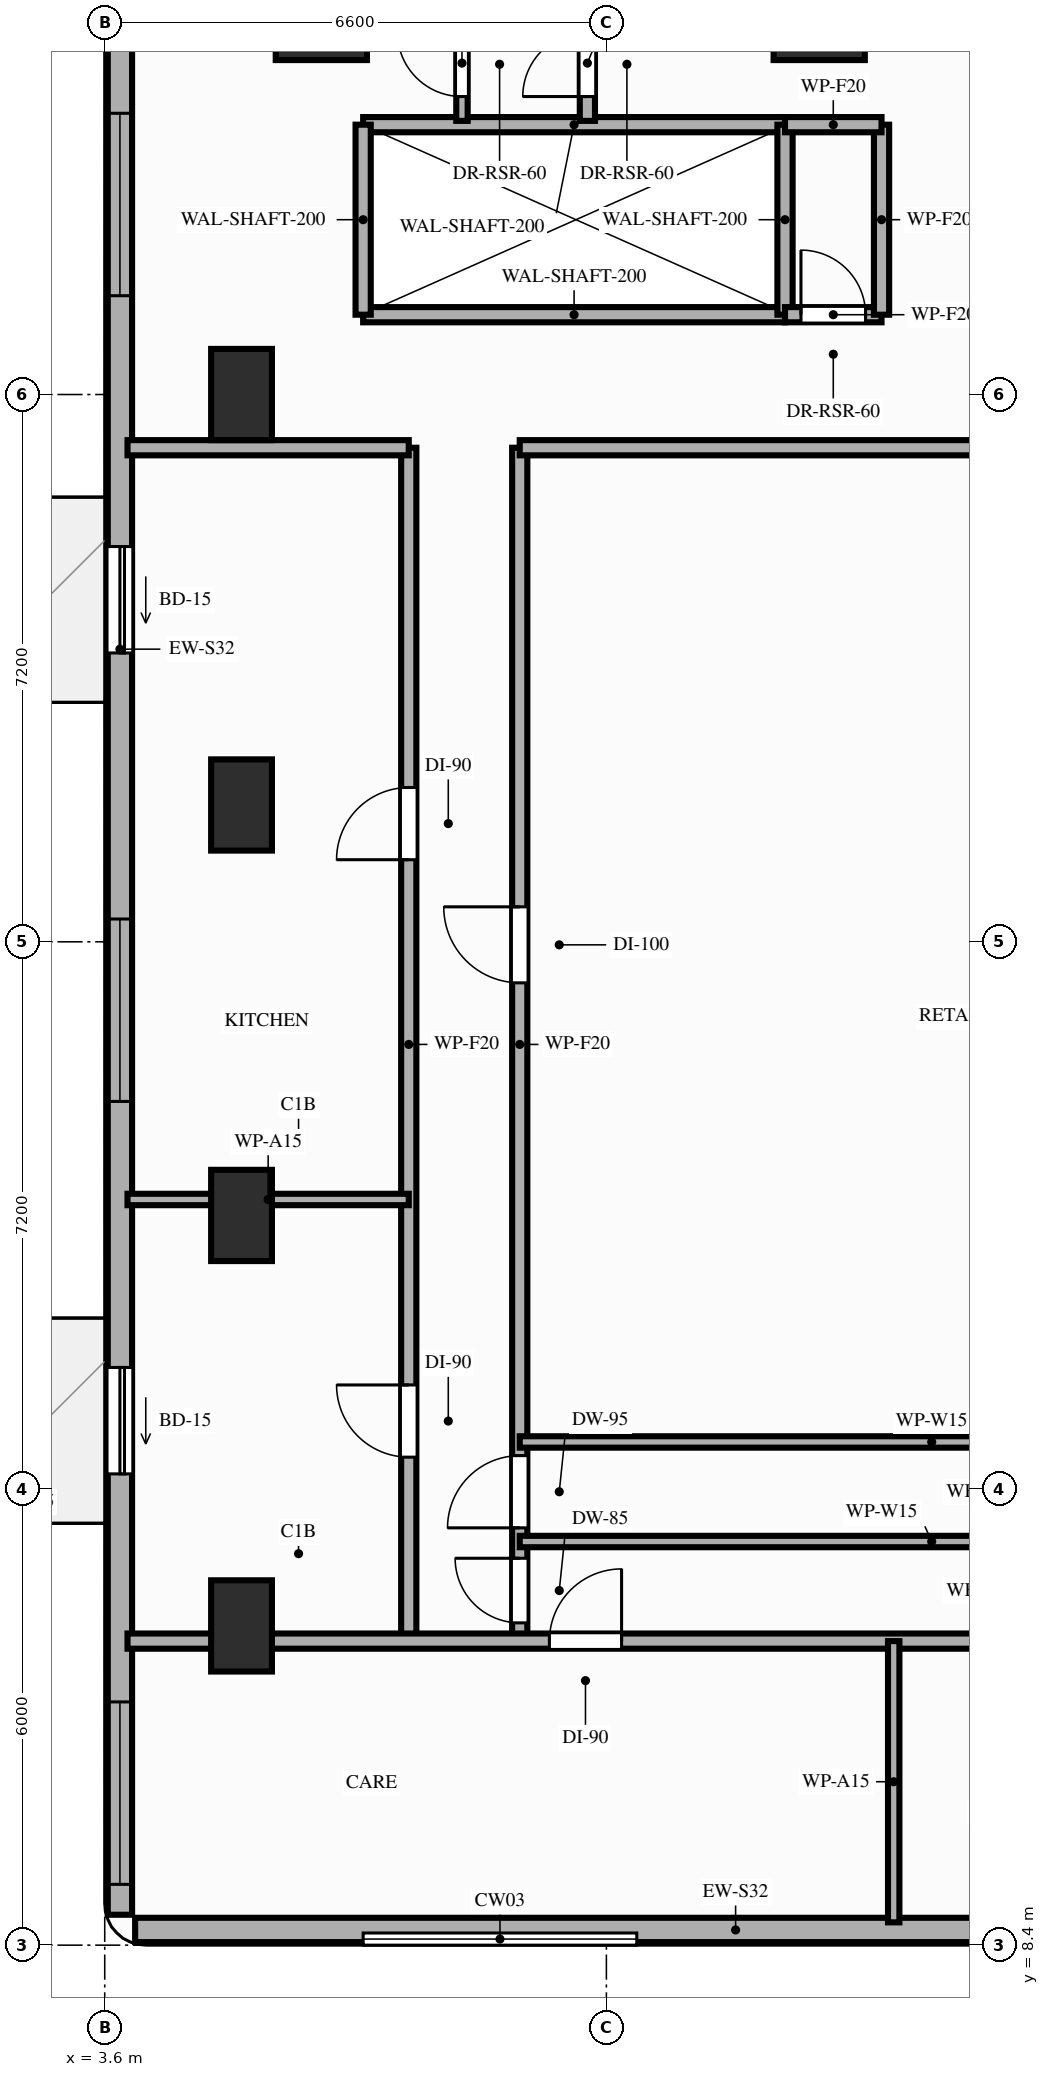
"""IFC4 building model, lengths in metres.
Left out: names, types, materials, properties, quantities, classifications, styles, units other than length and angle.
Written with IfcOpenShell. Run it as: python <this file> out.ifc"""

import sys

from ifc_helpers import new_model, si_unit, direction, frame, frame_2d, origin, origin_2d, place, context, subcontext, project, spatial, rectangle, extrude, element, fill, save


model = new_model("IFC4")
c1 = context("Model", 3, precision=1e-05, world=origin(), true_north=direction((0.0, 1.0)))
c2 = subcontext(c1, "Body", "Model", "MODEL_VIEW")
j1 = project(units=[si_unit("LENGTHUNIT", "METRE"), si_unit("PLANEANGLEUNIT", "RADIAN")], contexts=[c1])
p1 = place(None, origin())
s1 = spatial("IfcSite", under=j1, at=p1, CompositionType="ELEMENT")
p2 = place(p1, origin())
s2 = spatial("IfcBuilding", under=s1, at=p2, CompositionType="ELEMENT")
p3 = place(p2, frame((0.0, 0.0, 72.4)))
s3 = spatial("IfcBuildingStorey", under=s2, at=p3, CompositionType="ELEMENT", Elevation=72.4)
for number, where, z_axis, x_axis in (
    (1, (6.45, 33.8, 0.0), (0.0, 0.0, 1.0), (1.0, 0.0, 0.0)),
    (2, (13.0, 33.8, 0.0), (0.0, 0.0, 1.0), (1.0, 0.0, 0.0)),
):
    element("IfcColumn", number, at=place(p3, frame(where, z_axis=z_axis, x_axis=x_axis)), inside=s3, PredefinedType="COLUMN", context=c2, shape_type="SweptSolid", body=[
        extrude(rectangle(XDim=1.2, YDim=1.2, at=origin_2d()), origin(), (0.0, 0.0, 1.0), 3.2),
    ])
for number, where, z_axis, x_axis in (
    (3, (5.4, 12.6, 0.0), (0.0, 0.0, 1.0), (1.0, 0.0, 0.0)),
    (4, (5.4, 18.0, 0.0), (0.0, 0.0, 1.0), (1.0, 0.0, 0.0)),
    (5, (5.4, 23.4, 0.0), (0.0, 0.0, 1.0), (1.0, 0.0, 0.0)),
    (6, (5.4, 28.8, 0.0), (0.0, 0.0, 1.0), (1.0, 0.0, 0.0)),
):
    element("IfcColumn", number, at=place(p3, frame(where, z_axis=z_axis, x_axis=x_axis)), inside=s3, PredefinedType="COLUMN", context=c2, shape_type="SweptSolid", body=[
        extrude(rectangle(XDim=0.8, YDim=1.2, at=origin_2d()), origin(), (0.0, 0.0, 1.0), 3.2),
    ])
p4 = place(p3, frame((4.0, 8.6, 0.0), z_axis=(0.0, 0.0, 1.0), x_axis=(1.0, 0.0, 0.0)))
e7 = element("IfcWall", 7, at=p4, inside=s3, PredefinedType="STANDARD", context=c2, shape_type="SweptSolid", body=[
    extrude(rectangle(XDim=15.8, YDim=0.32, at=frame_2d((7.9, 0.0))), origin(), (0.0, 0.0, 1.0), 2.96),
])
p5 = place(p4, frame((11.2, 0.0, 0.85)))
e8 = element("IfcOpeningElement", 8, at=p5, cuts=e7, PredefinedType="OPENING", context=c2, shape_type="SweptSolid", body=[
    extrude(rectangle(XDim=2.4, YDim=1.8, at=frame_2d((1.2, 0.9))), frame((0.0, 0.17, 0.0), z_axis=(0.0, -1.0, 0.0), x_axis=(1.0, 0.0, 0.0)), (0.0, 0.0, 1.0), 0.34),
])
p6 = place(p3, frame((3.8, 42.1, 0.0), z_axis=(0.0, 0.0, 1.0), x_axis=(0.0, -1.0, 0.0)))
e9 = element("IfcWall", 9, at=p6, inside=s3, PredefinedType="STANDARD", context=c2, shape_type="SweptSolid", body=[
    extrude(rectangle(XDim=33.3, YDim=0.32, at=frame_2d((16.65, 0.0))), origin(), (0.0, 0.0, 1.0), 2.66),
])
p7 = place(p6, frame((26.1, 0.0, 0.0)))
e10 = element("IfcOpeningElement", 10, at=p7, cuts=e9, PredefinedType="OPENING", context=c2, shape_type="SweptSolid", body=[
    extrude(rectangle(XDim=1.4, YDim=2.1, at=frame_2d((0.7, 1.05))), frame((0.0, 0.17, 0.0), z_axis=(0.0, -1.0, 0.0), x_axis=(1.0, 0.0, 0.0)), (0.0, 0.0, 1.0), 0.34),
])
p8 = place(p6, frame((15.3, 0.0, 0.0)))
e11 = element("IfcOpeningElement", 11, at=p8, cuts=e9, PredefinedType="OPENING", context=c2, shape_type="SweptSolid", body=[
    extrude(rectangle(XDim=1.4, YDim=2.1, at=frame_2d((0.7, 1.05))), frame((0.0, 0.17, 0.0), z_axis=(0.0, -1.0, 0.0), x_axis=(1.0, 0.0, 0.0)), (0.0, 0.0, 1.0), 0.34),
])
p9 = place(p6, frame((30.5, 0.0, 0.85)))
e12 = element("IfcOpeningElement", 12, at=p9, cuts=e9, PredefinedType="OPENING", context=c2, shape_type="SweptSolid", body=[
    extrude(rectangle(XDim=2.4, YDim=1.56, at=frame_2d((1.2, 0.78))), frame((0.0, 0.17, 0.0), z_axis=(0.0, -1.0, 0.0), x_axis=(1.0, 0.0, 0.0)), (0.0, 0.0, 1.0), 0.34),
])
p10 = place(p6, frame((20.2, 0.0, 0.85)))
e13 = element("IfcOpeningElement", 13, at=p10, cuts=e9, PredefinedType="OPENING", context=c2, shape_type="SweptSolid", body=[
    extrude(rectangle(XDim=2.4, YDim=1.56, at=frame_2d((1.2, 0.78))), frame((0.0, 0.17, 0.0), z_axis=(0.0, -1.0, 0.0), x_axis=(1.0, 0.0, 0.0)), (0.0, 0.0, 1.0), 0.34),
])
p11 = place(p6, frame((9.6, 0.0, 0.85)))
e14 = element("IfcOpeningElement", 14, at=p11, cuts=e9, PredefinedType="OPENING", context=c2, shape_type="SweptSolid", body=[
    extrude(rectangle(XDim=2.4, YDim=1.56, at=frame_2d((1.2, 0.78))), frame((0.0, 0.17, 0.0), z_axis=(0.0, -1.0, 0.0), x_axis=(1.0, 0.0, 0.0)), (0.0, 0.0, 1.0), 0.34),
])
p12 = place(p6, frame((3.5, 0.0, 0.85)))
e15 = element("IfcOpeningElement", 15, at=p12, cuts=e9, PredefinedType="OPENING", context=c2, shape_type="SweptSolid", body=[
    extrude(rectangle(XDim=2.4, YDim=1.56, at=frame_2d((1.2, 0.78))), frame((0.0, 0.17, 0.0), z_axis=(0.0, -1.0, 0.0), x_axis=(1.0, 0.0, 0.0)), (0.0, 0.0, 1.0), 0.34),
])
for number, where, z_axis, x_axis in (
    (16, (7.0, 29.85, 0.0), (0.0, 0.0, 1.0), (1.0, 0.0, 0.0)),
    (17, (7.0, 32.35, 0.0), (0.0, 0.0, 1.0), (1.0, 0.0, 0.0)),
):
    element("IfcWall", number, at=place(p3, frame(where, z_axis=z_axis, x_axis=x_axis)), inside=s3, PredefinedType="MOVABLE", context=c2, shape_type="SweptSolid", body=[
        extrude(rectangle(XDim=5.55, YDim=0.2, at=frame_2d((2.775, 0.0))), origin(), (0.0, 0.0, 1.0), 2.96),
    ])
for number, where, z_axis, x_axis in (
    (18, (7.0, 29.85, 0.0), (0.0, 0.0, 1.0), (0.0, 1.0, 0.0)),
    (19, (12.55, 29.85, 0.0), (0.0, 0.0, 1.0), (0.0, 1.0, 0.0)),
):
    element("IfcWall", number, at=place(p3, frame(where, z_axis=z_axis, x_axis=x_axis)), inside=s3, PredefinedType="MOVABLE", context=c2, shape_type="SweptSolid", body=[
        extrude(rectangle(XDim=2.5, YDim=0.2, at=frame_2d((1.25, 0.0))), origin(), (0.0, 0.0, 1.0), 2.96),
    ])
p13 = place(p3, frame((9.95, 32.4, 0.0), z_axis=(0.0, 0.0, 1.0), x_axis=(0.0, 1.0, 0.0)))
e20 = element("IfcWall", 20, at=p13, inside=s3, PredefinedType="PARTITIONING", context=c2, shape_type="SweptSolid", body=[
    extrude(rectangle(XDim=1.52, YDim=0.2, at=frame_2d((0.76, 0.0))), origin(), (0.0, 0.0, 1.0), 2.35),
])
p14 = place(p13, frame((0.32, 0.0, 0.0)))
e21 = element("IfcOpeningElement", 21, at=p14, cuts=e20, PredefinedType="OPENING", context=c2, shape_type="SweptSolid", body=[
    extrude(rectangle(XDim=0.85, YDim=2.05, at=frame_2d((0.425, 1.025))), frame((0.0, 0.11, 0.0), z_axis=(0.0, -1.0, 0.0), x_axis=(1.0, 0.0, 0.0)), (0.0, 0.0, 1.0), 0.22),
])
p15 = place(p3, frame((8.3, 32.4, 0.0), z_axis=(0.0, 0.0, 1.0), x_axis=(0.0, 1.0, 0.0)))
e22 = element("IfcWall", 22, at=p15, inside=s3, PredefinedType="PARTITIONING", context=c2, shape_type="SweptSolid", body=[
    extrude(rectangle(XDim=1.52, YDim=0.15, at=frame_2d((0.76, 0.0))), origin(), (0.0, 0.0, 1.0), 2.35),
])
p16 = place(p15, frame((0.32, 0.0, 0.0)))
e23 = element("IfcOpeningElement", 23, at=p16, cuts=e22, PredefinedType="OPENING", context=c2, shape_type="SweptSolid", body=[
    extrude(rectangle(XDim=0.85, YDim=2.05, at=frame_2d((0.425, 1.025))), frame((0.0, 0.085, 0.0), z_axis=(0.0, -1.0, 0.0), x_axis=(1.0, 0.0, 0.0)), (0.0, 0.0, 1.0), 0.17),
])
p17 = place(p3, frame((12.55, 29.85, 0.0), z_axis=(0.0, 0.0, 1.0), x_axis=(1.0, 0.0, 0.0)))
e24 = element("IfcWall", 24, at=p17, inside=s3, PredefinedType="PARTITIONING", context=c2, shape_type="SweptSolid", body=[
    extrude(rectangle(XDim=1.27, YDim=0.2, at=frame_2d((0.635, 0.0))), origin(), (0.0, 0.0, 1.0), 2.96),
])
p18 = place(p17, frame((0.21, 0.0, 0.0)))
e25 = element("IfcOpeningElement", 25, at=p18, cuts=e24, PredefinedType="OPENING", context=c2, shape_type="SweptSolid", body=[
    extrude(rectangle(XDim=0.85, YDim=2.05, at=frame_2d((0.425, 1.025))), frame((0.0, 0.11, 0.0), z_axis=(0.0, -1.0, 0.0), x_axis=(1.0, 0.0, 0.0)), (0.0, 0.0, 1.0), 0.22),
])
p19 = place(p3, frame((13.82, 29.85, 0.0), z_axis=(0.0, 0.0, 1.0), x_axis=(0.0, 1.0, 0.0)))
e26 = element("IfcWall", 26, at=p19, inside=s3, PredefinedType="PARTITIONING", context=c2, shape_type="SweptSolid", body=[
    extrude(rectangle(XDim=2.5, YDim=0.2, at=frame_2d((1.25, 0.0))), origin(), (0.0, 0.0, 1.0), 2.96),
])
p20 = place(p3, frame((12.55, 32.35, 0.0), z_axis=(0.0, 0.0, 1.0), x_axis=(1.0, 0.0, 0.0)))
e27 = element("IfcWall", 27, at=p20, inside=s3, PredefinedType="PARTITIONING", context=c2, shape_type="SweptSolid", body=[
    extrude(rectangle(XDim=1.27, YDim=0.2, at=frame_2d((0.635, 0.0))), origin(), (0.0, 0.0, 1.0), 2.96),
])
p21 = place(p3, frame((7.6, 12.4, 0.0), z_axis=(0.0, 0.0, 1.0), x_axis=(0.0, 1.0, 0.0)))
e28 = element("IfcWall", 28, at=p21, inside=s3, PredefinedType="PARTITIONING", context=c2, shape_type="SweptSolid", body=[
    extrude(rectangle(XDim=15.7, YDim=0.2, at=frame_2d((7.85, 0.0))), origin(), (0.0, 0.0, 1.0), 2.35),
])
p22 = place(p21, frame((2.42, 0.0, 0.0)))
e29 = element("IfcOpeningElement", 29, at=p22, cuts=e28, PredefinedType="OPENING", context=c2, shape_type="SweptSolid", body=[
    extrude(rectangle(XDim=0.95, YDim=2.15, at=frame_2d((0.475, 1.075))), frame((0.0, 0.11, 0.0), z_axis=(0.0, -1.0, 0.0), x_axis=(1.0, 0.0, 0.0)), (0.0, 0.0, 1.0), 0.22),
])
p23 = place(p21, frame((10.28, 0.0, 0.0)))
e30 = element("IfcOpeningElement", 30, at=p23, cuts=e28, PredefinedType="OPENING", context=c2, shape_type="SweptSolid", body=[
    extrude(rectangle(XDim=0.95, YDim=2.15, at=frame_2d((0.475, 1.075))), frame((0.0, 0.11, 0.0), z_axis=(0.0, -1.0, 0.0), x_axis=(1.0, 0.0, 0.0)), (0.0, 0.0, 1.0), 0.22),
])
p24 = place(p3, frame((9.06, 12.4, 0.0), z_axis=(0.0, 0.0, 1.0), x_axis=(0.0, 1.0, 0.0)))
e31 = element("IfcWall", 31, at=p24, inside=s3, PredefinedType="PARTITIONING", context=c2, shape_type="SweptSolid", body=[
    extrude(rectangle(XDim=15.7, YDim=0.2, at=frame_2d((7.85, 0.0))), origin(), (0.0, 0.0, 1.0), 2.35),
])
p25 = place(p24, frame((0.24, 0.0, 0.0)))
e32 = element("IfcOpeningElement", 32, at=p25, cuts=e31, PredefinedType="OPENING", context=c2, shape_type="SweptSolid", body=[
    extrude(rectangle(XDim=0.85, YDim=2.1, at=frame_2d((0.425, 1.05))), frame((0.0, 0.11, 0.0), z_axis=(0.0, -1.0, 0.0), x_axis=(1.0, 0.0, 0.0)), (0.0, 0.0, 1.0), 0.22),
])
p26 = place(p24, frame((1.49, 0.0, 0.0)))
e33 = element("IfcOpeningElement", 33, at=p26, cuts=e31, PredefinedType="OPENING", context=c2, shape_type="SweptSolid", body=[
    extrude(rectangle(XDim=0.95, YDim=2.1, at=frame_2d((0.475, 1.05))), frame((0.0, 0.11, 0.0), z_axis=(0.0, -1.0, 0.0), x_axis=(1.0, 0.0, 0.0)), (0.0, 0.0, 1.0), 0.22),
])
p27 = place(p24, frame((8.66, 0.0, 0.0)))
e34 = element("IfcOpeningElement", 34, at=p27, cuts=e31, PredefinedType="OPENING", context=c2, shape_type="SweptSolid", body=[
    extrude(rectangle(XDim=1.0, YDim=2.15, at=frame_2d((0.5, 1.075))), frame((0.0, 0.11, 0.0), z_axis=(0.0, -1.0, 0.0), x_axis=(1.0, 0.0, 0.0)), (0.0, 0.0, 1.0), 0.22),
])
p28 = place(p3, frame((3.9, 12.4, 0.0), z_axis=(0.0, 0.0, 1.0), x_axis=(1.0, 0.0, 0.0)))
e35 = element("IfcWall", 35, at=p28, inside=s3, PredefinedType="PARTITIONING", context=c2, shape_type="SweptSolid", body=[
    extrude(rectangle(XDim=16.0, YDim=0.2, at=frame_2d((8.0, 0.0))), origin(), (0.0, 0.0, 1.0), 2.35),
])
p29 = place(p28, frame((5.55, 0.0, 0.0)))
e36 = element("IfcOpeningElement", 36, at=p29, cuts=e35, PredefinedType="OPENING", context=c2, shape_type="SweptSolid", body=[
    extrude(rectangle(XDim=0.95, YDim=2.15, at=frame_2d((0.475, 1.075))), frame((0.0, 0.11, 0.0), z_axis=(0.0, -1.0, 0.0), x_axis=(1.0, 0.0, 0.0)), (0.0, 0.0, 1.0), 0.22),
])
p30 = place(p28, frame((12.56, 0.0, 0.0)))
e37 = element("IfcOpeningElement", 37, at=p30, cuts=e35, PredefinedType="OPENING", context=c2, shape_type="SweptSolid", body=[
    extrude(rectangle(XDim=0.95, YDim=2.15, at=frame_2d((0.475, 1.075))), frame((0.0, 0.11, 0.0), z_axis=(0.0, -1.0, 0.0), x_axis=(1.0, 0.0, 0.0)), (0.0, 0.0, 1.0), 0.22),
])
p31 = place(p3, frame((3.9, 28.1, 0.0), z_axis=(0.0, 0.0, 1.0), x_axis=(1.0, 0.0, 0.0)))
e38 = element("IfcWall", 38, at=p31, inside=s3, PredefinedType="PARTITIONING", context=c2, shape_type="SweptSolid", body=[
    extrude(rectangle(XDim=3.7, YDim=0.2, at=frame_2d((1.85, 0.0))), origin(), (0.0, 0.0, 1.0), 2.35),
])
p32 = place(p3, frame((9.06, 28.1, 0.0), z_axis=(0.0, 0.0, 1.0), x_axis=(1.0, 0.0, 0.0)))
e39 = element("IfcWall", 39, at=p32, inside=s3, PredefinedType="PARTITIONING", context=c2, shape_type="SweptSolid", body=[
    extrude(rectangle(XDim=10.84, YDim=0.2, at=frame_2d((5.42, 0.0))), origin(), (0.0, 0.0, 1.0), 2.35),
])
p33 = place(p3, frame((3.9, 18.21, 0.0), z_axis=(0.0, 0.0, 1.0), x_axis=(1.0, 0.0, 0.0)))
e40 = element("IfcWall", 40, at=p33, inside=s3, PredefinedType="PARTITIONING", context=c2, shape_type="SweptSolid", body=[
    extrude(rectangle(XDim=3.7, YDim=0.15, at=frame_2d((1.85, 0.0))), origin(), (0.0, 0.0, 1.0), 2.35),
])
p34 = place(p3, frame((13.98, 8.7, 0.0), z_axis=(0.0, 0.0, 1.0), x_axis=(0.0, 1.0, 0.0)))
e41 = element("IfcWall", 41, at=p34, inside=s3, PredefinedType="PARTITIONING", context=c2, shape_type="SweptSolid", body=[
    extrude(rectangle(XDim=3.7, YDim=0.15, at=frame_2d((1.85, 0.0))), origin(), (0.0, 0.0, 1.0), 2.35),
])
for number, where, z_axis, x_axis in (
    (42, (9.06, 13.71, 0.0), (0.0, 0.0, 1.0), (1.0, 0.0, 0.0)),
    (43, (9.06, 15.02, 0.0), (0.0, 0.0, 1.0), (1.0, 0.0, 0.0)),
):
    element("IfcWall", number, at=place(p3, frame(where, z_axis=z_axis, x_axis=x_axis)), inside=s3, PredefinedType="PARTITIONING", context=c2, shape_type="SweptSolid", body=[
        extrude(rectangle(XDim=10.84, YDim=0.15, at=frame_2d((5.42, 0.0))), origin(), (0.0, 0.0, 1.0), 2.35),
    ])
p35 = place(p7, origin())
e44 = element("IfcDoor", 44, at=p35, inside=s3, OperationType="SLIDING_TO_RIGHT", PredefinedType="DOOR", context=c2, shape_type="SweptSolid", body=[
    extrude(rectangle(XDim=1.4, YDim=2.1, at=frame_2d((0.7, 1.05))), frame((0.0, 0.025, 0.0), z_axis=(0.0, -1.0, 0.0), x_axis=(1.0, 0.0, 0.0)), (0.0, 0.0, 1.0), 0.05),
])
fill(e10, e44)
p36 = place(p8, origin())
e45 = element("IfcDoor", 45, at=p36, inside=s3, OperationType="SLIDING_TO_RIGHT", PredefinedType="DOOR", context=c2, shape_type="SweptSolid", body=[
    extrude(rectangle(XDim=1.4, YDim=2.1, at=frame_2d((0.7, 1.05))), frame((0.0, 0.025, 0.0), z_axis=(0.0, -1.0, 0.0), x_axis=(1.0, 0.0, 0.0)), (0.0, 0.0, 1.0), 0.05),
])
fill(e11, e45)
p37 = place(p9, origin())
e46 = element("IfcWindow", 46, at=p37, inside=s3, PartitioningType="SINGLE_PANEL", PredefinedType="WINDOW", context=c2, shape_type="SweptSolid", body=[
    extrude(rectangle(XDim=2.4, YDim=1.56, at=frame_2d((1.2, 0.78))), frame((0.0, 0.03, 0.0), z_axis=(0.0, -1.0, 0.0), x_axis=(1.0, 0.0, 0.0)), (0.0, 0.0, 1.0), 0.06),
])
fill(e12, e46)
p38 = place(p10, origin())
e47 = element("IfcWindow", 47, at=p38, inside=s3, PartitioningType="SINGLE_PANEL", PredefinedType="WINDOW", context=c2, shape_type="SweptSolid", body=[
    extrude(rectangle(XDim=2.4, YDim=1.56, at=frame_2d((1.2, 0.78))), frame((0.0, 0.03, 0.0), z_axis=(0.0, -1.0, 0.0), x_axis=(1.0, 0.0, 0.0)), (0.0, 0.0, 1.0), 0.06),
])
fill(e13, e47)
p39 = place(p11, origin())
e48 = element("IfcWindow", 48, at=p39, inside=s3, PartitioningType="SINGLE_PANEL", PredefinedType="WINDOW", context=c2, shape_type="SweptSolid", body=[
    extrude(rectangle(XDim=2.4, YDim=1.56, at=frame_2d((1.2, 0.78))), frame((0.0, 0.03, 0.0), z_axis=(0.0, -1.0, 0.0), x_axis=(1.0, 0.0, 0.0)), (0.0, 0.0, 1.0), 0.06),
])
fill(e14, e48)
p40 = place(p14, origin())
e49 = element("IfcDoor", 49, at=p40, inside=s3, OperationType="SINGLE_SWING_LEFT", PredefinedType="DOOR", context=c2, shape_type="SweptSolid", body=[
    extrude(rectangle(XDim=0.85, YDim=2.05, at=frame_2d((0.425, 1.025))), frame((0.0, 0.025, 0.0), z_axis=(0.0, -1.0, 0.0), x_axis=(1.0, 0.0, 0.0)), (0.0, 0.0, 1.0), 0.05),
])
fill(e21, e49)
p41 = place(p16, origin())
e50 = element("IfcDoor", 50, at=p41, inside=s3, OperationType="SINGLE_SWING_RIGHT", PredefinedType="DOOR", context=c2, shape_type="SweptSolid", body=[
    extrude(rectangle(XDim=0.85, YDim=2.05, at=frame_2d((0.425, 1.025))), frame((0.0, 0.025, 0.0), z_axis=(0.0, -1.0, 0.0), x_axis=(1.0, 0.0, 0.0)), (0.0, 0.0, 1.0), 0.05),
])
fill(e23, e50)
p42 = place(p18, origin())
e51 = element("IfcDoor", 51, at=p42, inside=s3, OperationType="SINGLE_SWING_LEFT", PredefinedType="DOOR", context=c2, shape_type="SweptSolid", body=[
    extrude(rectangle(XDim=0.85, YDim=2.05, at=frame_2d((0.425, 1.025))), frame((0.0, 0.025, 0.0), z_axis=(0.0, -1.0, 0.0), x_axis=(1.0, 0.0, 0.0)), (0.0, 0.0, 1.0), 0.05),
])
fill(e25, e51)
p43 = place(p22, origin())
e52 = element("IfcDoor", 52, at=p43, inside=s3, OperationType="SINGLE_SWING_RIGHT", PredefinedType="DOOR", context=c2, shape_type="SweptSolid", body=[
    extrude(rectangle(XDim=0.95, YDim=2.15, at=frame_2d((0.475, 1.075))), frame((0.0, 0.025, 0.0), z_axis=(0.0, -1.0, 0.0), x_axis=(1.0, 0.0, 0.0)), (0.0, 0.0, 1.0), 0.05),
])
fill(e29, e52)
p44 = place(p23, origin())
e53 = element("IfcDoor", 53, at=p44, inside=s3, OperationType="SINGLE_SWING_LEFT", PredefinedType="DOOR", context=c2, shape_type="SweptSolid", body=[
    extrude(rectangle(XDim=0.95, YDim=2.15, at=frame_2d((0.475, 1.075))), frame((0.0, 0.025, 0.0), z_axis=(0.0, -1.0, 0.0), x_axis=(1.0, 0.0, 0.0)), (0.0, 0.0, 1.0), 0.05),
])
fill(e30, e53)
p45 = place(p29, origin())
e54 = element("IfcDoor", 54, at=p45, inside=s3, OperationType="SINGLE_SWING_RIGHT", PredefinedType="DOOR", context=c2, shape_type="SweptSolid", body=[
    extrude(rectangle(XDim=0.95, YDim=2.15, at=frame_2d((0.475, 1.075))), frame((0.0, 0.025, 0.0), z_axis=(0.0, -1.0, 0.0), x_axis=(1.0, 0.0, 0.0)), (0.0, 0.0, 1.0), 0.05),
])
fill(e36, e54)
p46 = place(p25, origin())
e55 = element("IfcDoor", 55, at=p46, inside=s3, OperationType="SINGLE_SWING_RIGHT", PredefinedType="DOOR", context=c2, shape_type="SweptSolid", body=[
    extrude(rectangle(XDim=0.85, YDim=2.1, at=frame_2d((0.425, 1.05))), frame((0.0, 0.025, 0.0), z_axis=(0.0, -1.0, 0.0), x_axis=(1.0, 0.0, 0.0)), (0.0, 0.0, 1.0), 0.05),
])
fill(e32, e55)
p47 = place(p26, origin())
e56 = element("IfcDoor", 56, at=p47, inside=s3, OperationType="SINGLE_SWING_LEFT", PredefinedType="DOOR", context=c2, shape_type="SweptSolid", body=[
    extrude(rectangle(XDim=0.95, YDim=2.1, at=frame_2d((0.475, 1.05))), frame((0.0, 0.025, 0.0), z_axis=(0.0, -1.0, 0.0), x_axis=(1.0, 0.0, 0.0)), (0.0, 0.0, 1.0), 0.05),
])
fill(e33, e56)
p48 = place(p27, origin())
e57 = element("IfcDoor", 57, at=p48, inside=s3, OperationType="SINGLE_SWING_RIGHT", PredefinedType="DOOR", context=c2, shape_type="SweptSolid", body=[
    extrude(rectangle(XDim=1.0, YDim=2.15, at=frame_2d((0.5, 1.075))), frame((0.0, 0.025, 0.0), z_axis=(0.0, -1.0, 0.0), x_axis=(1.0, 0.0, 0.0)), (0.0, 0.0, 1.0), 0.05),
])
fill(e34, e57)
save(model, sys.argv[1])
